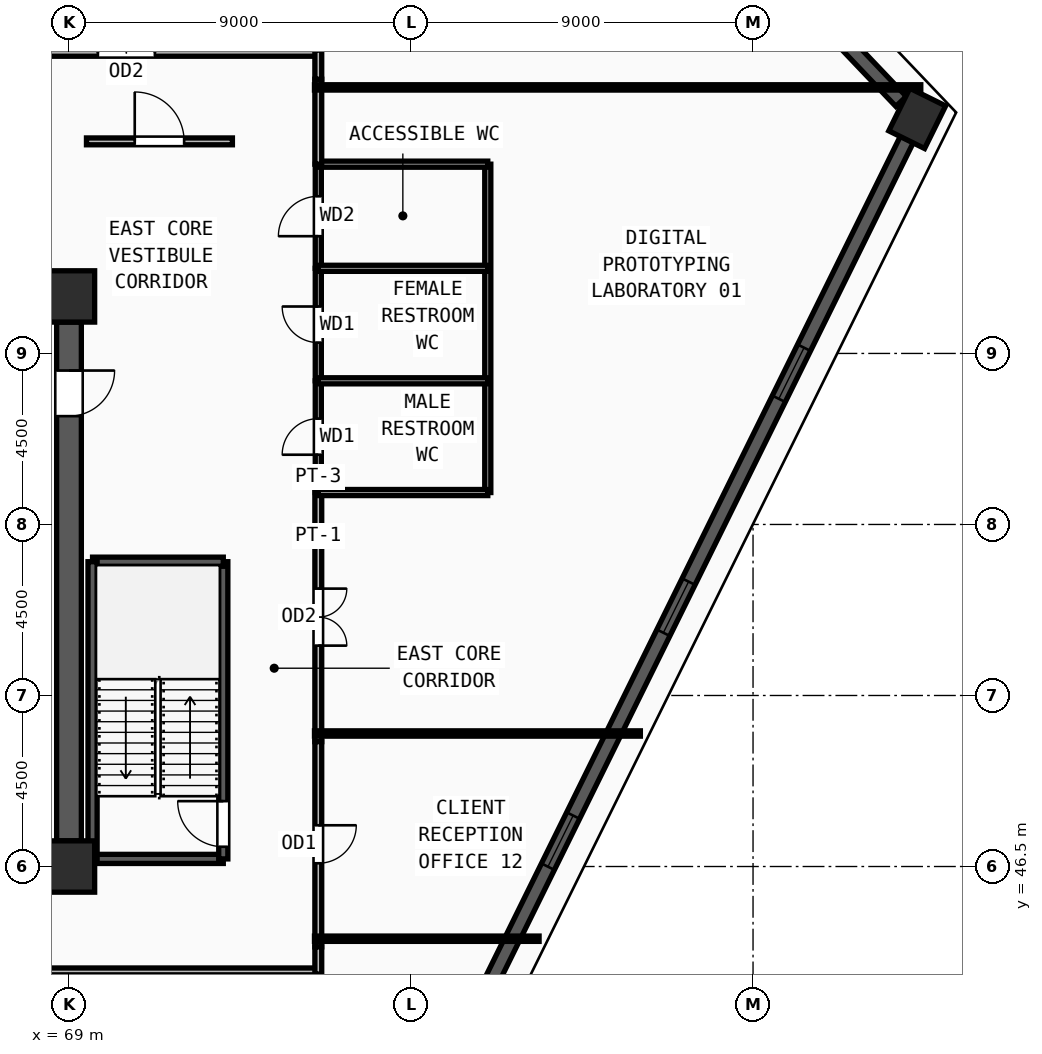
"""IFC4 building model, lengths in metres.
Left out: names, types, materials, properties, quantities, classifications, styles, units other than length and angle.
Written with IfcOpenShell. Run it as: python <this file> out.ifc"""

import sys

from ifc_helpers import new_model, si_unit, direction, frame, frame_2d, origin, origin_2d, place, context, subcontext, project, spatial, rectangle, extrude, source, transform, mapped, element, fill, save


model = new_model("IFC4")
c1 = context("Model", 3, precision=1e-05, world=origin(), true_north=direction((0.0, 1.0)))
c2 = subcontext(c1, "Body", "Model", "MODEL_VIEW")
j1 = project(units=[si_unit("LENGTHUNIT", "METRE"), si_unit("PLANEANGLEUNIT", "RADIAN")], contexts=[c1])
p1 = place(None, origin())
s1 = spatial("IfcSite", under=j1, at=p1, CompositionType="ELEMENT")
p2 = place(p1, origin())
s2 = spatial("IfcBuilding", under=s1, at=p2, CompositionType="ELEMENT")
p3 = place(p2, frame((0.0, 0.0, 270.0)))
s3 = spatial("IfcBuildingStorey", under=s2, at=p3, CompositionType="ELEMENT", Elevation=270.0)
m1 = source(origin(), c2, "Body", "SweptSolid", [
    extrude(rectangle(XDim=1.35, YDim=1.35, at=origin_2d()), origin(), (0.0, 0.0, 1.0), 3.75),
])
for number, where, z_axis, x_axis in (
    (1, (69.0, 46.5, 0.0), (0.0, 0.0, 1.0), (1.0, 0.0, 0.0)),
    (2, (69.0, 61.5, 0.0), (0.0, 0.0, 1.0), (1.0, 0.0, 0.0)),
):
    element("IfcColumn", number, at=place(p3, frame(where, z_axis=z_axis, x_axis=x_axis)), inside=s3, PredefinedType="COLUMN", context=c2, shape_type="MappedRepresentation", body=[
        mapped(m1, transform((0.0, 0.0, 0.0), x_axis=(1.0, 0.0, 0.0), y_axis=(0.0, 1.0, 0.0), z_axis=(0.0, 0.0, 1.0), scale=1.0)),
    ])
m2 = source(origin(), c2, "Body", "SweptSolid", [
    extrude(rectangle(XDim=1.25, YDim=1.05, at=origin_2d()), origin(), (0.0, 0.0, 1.0), 3.75),
])
p4 = place(p3, frame((91.32, 66.185, 0.0), z_axis=(0.0, 0.0, 1.0), x_axis=(0.442601730913, 0.896718299017, 0.0)))
e3 = element("IfcColumn", 3, at=p4, inside=s3, PredefinedType="COLUMN", context=c2, shape_type="MappedRepresentation", body=[
    mapped(m2, transform((0.0, 0.0, 0.0), x_axis=(1.0, 0.0, 0.0), y_axis=(0.0, 1.0, 0.0), z_axis=(0.0, 0.0, 1.0), scale=1.0)),
])
p5 = place(p3, frame((78.897, 41.013, 0.0), z_axis=(0.0, 0.0, 1.0), x_axis=(0.44256239755, 0.896737712084, 0.0)))
e4 = element("IfcWall", 4, at=p5, inside=s3, PredefinedType="SOLIDWALL", context=c2, shape_type="SweptSolid", body=[
    extrude(rectangle(XDim=27.456, YDim=0.38, at=frame_2d((13.728, 0.0))), origin(), (0.0, 0.0, 1.0), 3.57),
])
m3 = source(origin(), c2, "Body", "SweptSolid", [
    extrude(rectangle(XDim=1.5, YDim=1.9, at=frame_2d((0.75, 0.95))), frame((0.0, 0.2, 0.0), z_axis=(0.0, -1.0, 0.0), x_axis=(1.0, 0.0, 0.0)), (0.0, 0.0, 1.0), 0.4),
])
p6 = place(p5, frame((6.114, 0.0, 0.55)))
e5 = element("IfcOpeningElement", 5, at=p6, cuts=e4, PredefinedType="OPENING", context=c2, shape_type="MappedRepresentation", body=[
    mapped(m3, transform((0.0, 0.0, 0.0), x_axis=(1.0, 0.0, 0.0), y_axis=(0.0, 1.0, 0.0), z_axis=(0.0, 0.0, 1.0), scale=1.0)),
])
p7 = place(p5, frame((12.978, 0.0, 0.55)))
e6 = element("IfcOpeningElement", 6, at=p7, cuts=e4, PredefinedType="OPENING", context=c2, shape_type="MappedRepresentation", body=[
    mapped(m3, transform((0.0, 0.0, 0.0), x_axis=(1.0, 0.0, 0.0), y_axis=(0.0, 1.0, 0.0), z_axis=(0.0, 0.0, 1.0), scale=1.0)),
])
p8 = place(p5, frame((19.842, 0.0, 0.55)))
e7 = element("IfcOpeningElement", 7, at=p8, cuts=e4, PredefinedType="OPENING", context=c2, shape_type="MappedRepresentation", body=[
    mapped(m3, transform((0.0, 0.0, 0.0), x_axis=(1.0, 0.0, 0.0), y_axis=(0.0, 1.0, 0.0), z_axis=(0.0, 0.0, 1.0), scale=1.0)),
])
p9 = place(p3, frame((90.896, 66.631, 0.0), z_axis=(0.0, 0.0, 1.0), x_axis=(-0.689385443417, 0.724394720028, 0.0)))
e8 = element("IfcWall", 8, at=p9, inside=s3, PredefinedType="SOLIDWALL", context=c2, shape_type="SweptSolid", body=[
    extrude(rectangle(XDim=4.024, YDim=0.38, at=frame_2d((2.012, 0.0))), origin(), (0.0, 0.0, 1.0), 3.57),
])
p10 = place(p3, frame((69.0, 60.825, 0.0), z_axis=(0.0, 0.0, 1.0), x_axis=(0.0, -1.0, 0.0)))
e9 = element("IfcWall", 9, at=p10, inside=s3, PredefinedType="SHEAR", context=c2, shape_type="SweptSolid", body=[
    extrude(rectangle(XDim=13.65, YDim=0.65, at=frame_2d((6.825, 0.0))), origin(), (0.0, 0.0, 1.0), 3.57),
])
m4 = source(origin(), c2, "Body", "SweptSolid", [
    extrude(rectangle(XDim=1.2, YDim=2.2, at=frame_2d((0.6, 1.1))), frame((0.0, 0.335, 0.0), z_axis=(0.0, -1.0, 0.0), x_axis=(1.0, 0.0, 0.0)), (0.0, 0.0, 1.0), 0.67),
])
p11 = place(p10, frame((1.275, 0.0, 0.0)))
e10 = element("IfcOpeningElement", 10, at=p11, cuts=e9, PredefinedType="OPENING", context=c2, shape_type="MappedRepresentation", body=[
    mapped(m4, transform((0.0, 0.0, 0.0), x_axis=(1.0, 0.0, 0.0), y_axis=(0.0, 1.0, 0.0), z_axis=(0.0, 0.0, 1.0), scale=1.0)),
])
p12 = place(p3, frame((69.62, 46.7, 0.0), z_axis=(0.0, 0.0, 1.0), x_axis=(1.0, 0.0, 0.0)))
e11 = element("IfcWall", 11, at=p12, inside=s3, PredefinedType="SOLIDWALL", context=c2, shape_type="SweptSolid", body=[
    extrude(rectangle(XDim=3.44, YDim=0.24, at=frame_2d((1.72, 0.0))), origin(), (0.0, 0.0, 1.0), 3.57),
])
p13 = place(p3, frame((73.06, 46.7, 0.0), z_axis=(0.0, 0.0, 1.0), x_axis=(0.0, 1.0, 0.0)))
e12 = element("IfcWall", 12, at=p13, inside=s3, PredefinedType="SOLIDWALL", context=c2, shape_type="SweptSolid", body=[
    extrude(rectangle(XDim=7.82, YDim=0.24, at=frame_2d((3.91, 0.0))), origin(), (0.0, 0.0, 1.0), 3.57),
])
m5 = source(origin(), c2, "Body", "SweptSolid", [
    extrude(rectangle(XDim=1.2, YDim=2.2, at=frame_2d((0.6, 1.1))), frame((0.0, 0.13, 0.0), z_axis=(0.0, -1.0, 0.0), x_axis=(1.0, 0.0, 0.0)), (0.0, 0.0, 1.0), 0.26),
])
p14 = place(p13, frame((0.32, 0.0, 0.0)))
e13 = element("IfcOpeningElement", 13, at=p14, cuts=e12, PredefinedType="OPENING", context=c2, shape_type="MappedRepresentation", body=[
    mapped(m5, transform((0.0, 0.0, 0.0), x_axis=(1.0, 0.0, 0.0), y_axis=(0.0, 1.0, 0.0), z_axis=(0.0, 0.0, 1.0), scale=1.0)),
])
p15 = place(p3, frame((73.06, 54.52, 0.0), z_axis=(0.0, 0.0, 1.0), x_axis=(-1.0, 0.0, 0.0)))
e14 = element("IfcWall", 14, at=p15, inside=s3, PredefinedType="SOLIDWALL", context=c2, shape_type="SweptSolid", body=[
    extrude(rectangle(XDim=3.44, YDim=0.24, at=frame_2d((1.72, 0.0))), origin(), (0.0, 0.0, 1.0), 3.57),
])
p16 = place(p3, frame((69.62, 54.52, 0.0), z_axis=(0.0, 0.0, 1.0), x_axis=(0.0, -1.0, 0.0)))
e15 = element("IfcWall", 15, at=p16, inside=s3, PredefinedType="SOLIDWALL", context=c2, shape_type="SweptSolid", body=[
    extrude(rectangle(XDim=7.82, YDim=0.24, at=frame_2d((3.91, 0.0))), origin(), (0.0, 0.0, 1.0), 3.57),
])
p17 = place(p3, frame((75.56, 56.34, 0.0), z_axis=(0.0, 0.0, 1.0), x_axis=(0.0, 1.0, 0.0)))
e16 = element("IfcWall", 16, at=p17, inside=s3, PredefinedType="PARTITIONING", context=c2, shape_type="SweptSolid", body=[
    extrude(rectangle(XDim=2.94, YDim=0.16, at=frame_2d((1.47, 0.0))), origin(), (0.0, 0.0, 1.0), 3.57),
])
m6 = source(origin(), c2, "Body", "SweptSolid", [
    extrude(rectangle(XDim=0.95, YDim=2.15, at=frame_2d((0.475, 1.075))), frame((0.0, 0.09, 0.0), z_axis=(0.0, -1.0, 0.0), x_axis=(1.0, 0.0, 0.0)), (0.0, 0.0, 1.0), 0.18),
])
p18 = place(p17, frame((0.995, 0.0, 0.0)))
e17 = element("IfcOpeningElement", 17, at=p18, cuts=e16, PredefinedType="OPENING", context=c2, shape_type="MappedRepresentation", body=[
    mapped(m6, transform((0.0, 0.0, 0.0), x_axis=(1.0, 0.0, 0.0), y_axis=(0.0, 1.0, 0.0), z_axis=(0.0, 0.0, 1.0), scale=1.0)),
])
p19 = place(p3, frame((75.56, 59.28, 0.0), z_axis=(0.0, 0.0, 1.0), x_axis=(0.0, 1.0, 0.0)))
e18 = element("IfcWall", 18, at=p19, inside=s3, PredefinedType="PARTITIONING", context=c2, shape_type="SweptSolid", body=[
    extrude(rectangle(XDim=2.96, YDim=0.16, at=frame_2d((1.48, 0.0))), origin(), (0.0, 0.0, 1.0), 3.57),
])
p20 = place(p19, frame((1.005, 0.0, 0.0)))
e19 = element("IfcOpeningElement", 19, at=p20, cuts=e18, PredefinedType="OPENING", context=c2, shape_type="MappedRepresentation", body=[
    mapped(m6, transform((0.0, 0.0, 0.0), x_axis=(1.0, 0.0, 0.0), y_axis=(0.0, 1.0, 0.0), z_axis=(0.0, 0.0, 1.0), scale=1.0)),
])
p21 = place(p3, frame((75.56, 62.24, 0.0), z_axis=(0.0, 0.0, 1.0), x_axis=(0.0, 1.0, 0.0)))
e20 = element("IfcWall", 20, at=p21, inside=s3, PredefinedType="PARTITIONING", context=c2, shape_type="SweptSolid", body=[
    extrude(rectangle(XDim=2.74, YDim=0.16, at=frame_2d((1.37, 0.0))), origin(), (0.0, 0.0, 1.0), 3.57),
])
m7 = source(origin(), c2, "Body", "SweptSolid", [
    extrude(rectangle(XDim=1.05, YDim=2.15, at=frame_2d((0.525, 1.075))), frame((0.0, 0.09, 0.0), z_axis=(0.0, -1.0, 0.0), x_axis=(1.0, 0.0, 0.0)), (0.0, 0.0, 1.0), 0.18),
])
p22 = place(p21, frame((0.845, 0.0, 0.0)))
e21 = element("IfcOpeningElement", 21, at=p22, cuts=e20, PredefinedType="OPENING", context=c2, shape_type="MappedRepresentation", body=[
    mapped(m7, transform((0.0, 0.0, 0.0), x_axis=(1.0, 0.0, 0.0), y_axis=(0.0, 1.0, 0.0), z_axis=(0.0, 0.0, 1.0), scale=1.0)),
])
p23 = place(p3, frame((69.46, 65.58, 0.0), z_axis=(0.0, 0.0, 1.0), x_axis=(1.0, 0.0, 0.0)))
e22 = element("IfcWall", 22, at=p23, inside=s3, PredefinedType="PARTITIONING", context=c2, shape_type="SweptSolid", body=[
    extrude(rectangle(XDim=3.84, YDim=0.18, at=frame_2d((1.92, 0.0))), origin(), (0.0, 0.0, 1.0), 3.57),
])
m8 = source(origin(), c2, "Body", "SweptSolid", [
    extrude(rectangle(XDim=1.3, YDim=2.2, at=frame_2d((0.65, 1.1))), frame((0.0, 0.1, 0.0), z_axis=(0.0, -1.0, 0.0), x_axis=(1.0, 0.0, 0.0)), (0.0, 0.0, 1.0), 0.2),
])
p24 = place(p23, frame((1.27, 0.0, 0.0)))
e23 = element("IfcOpeningElement", 23, at=p24, cuts=e22, PredefinedType="OPENING", context=c2, shape_type="MappedRepresentation", body=[
    mapped(m8, transform((0.0, 0.0, 0.0), x_axis=(1.0, 0.0, 0.0), y_axis=(0.0, 1.0, 0.0), z_axis=(0.0, 0.0, 1.0), scale=1.0)),
])
p25 = place(p3, frame((75.56, 56.34, 0.0), z_axis=(0.0, 0.0, 1.0), x_axis=(0.0, -1.0, 0.0)))
e24 = element("IfcWall", 24, at=p25, inside=s3, PredefinedType="PARTITIONING", context=c2, shape_type="SweptSolid", body=[
    extrude(rectangle(XDim=6.555, YDim=0.18, at=frame_2d((3.278, 0.0))), origin(), (0.0, 0.0, 1.0), 3.57),
])
m9 = source(origin(), c2, "Body", "SweptSolid", [
    extrude(rectangle(XDim=1.5, YDim=2.2, at=frame_2d((0.75, 1.1))), frame((0.0, 0.1, 0.0), z_axis=(0.0, -1.0, 0.0), x_axis=(1.0, 0.0, 0.0)), (0.0, 0.0, 1.0), 0.2),
])
p26 = place(p25, frame((2.528, 0.0, 0.0)))
e25 = element("IfcOpeningElement", 25, at=p26, cuts=e24, PredefinedType="OPENING", context=c2, shape_type="MappedRepresentation", body=[
    mapped(m9, transform((0.0, 0.0, 0.0), x_axis=(1.0, 0.0, 0.0), y_axis=(0.0, 1.0, 0.0), z_axis=(0.0, 0.0, 1.0), scale=1.0)),
])
p27 = place(p3, frame((65.39, 67.91, 0.0), z_axis=(0.0, 0.0, 1.0), x_axis=(1.0, 0.0, 0.0)))
e26 = element("IfcWall", 26, at=p27, inside=s3, PredefinedType="PARTITIONING", context=c2, shape_type="SweptSolid", body=[
    extrude(rectangle(XDim=10.24, YDim=0.18, at=frame_2d((5.12, 0.0))), origin(), (0.0, 0.0, 1.0), 3.205),
])
p28 = place(p27, frame((4.37, 0.0, 0.0)))
e27 = element("IfcOpeningElement", 27, at=p28, cuts=e26, PredefinedType="OPENING", context=c2, shape_type="MappedRepresentation", body=[
    mapped(m9, transform((0.0, 0.0, 0.0), x_axis=(1.0, 0.0, 0.0), y_axis=(0.0, 1.0, 0.0), z_axis=(0.0, 0.0, 1.0), scale=1.0)),
])
p29 = place(p3, frame((75.63, 43.74, 0.0), z_axis=(0.0, 0.0, 1.0), x_axis=(-1.0, 0.0, 0.0)))
e28 = element("IfcWall", 28, at=p29, inside=s3, PredefinedType="PARTITIONING", context=c2, shape_type="SweptSolid", body=[
    extrude(rectangle(XDim=20.415, YDim=0.18, at=frame_2d((10.208, 0.0))), origin(), (0.0, 0.0, 1.0), 3.57),
])
p30 = place(p29, frame((9.457, 0.0, 0.0)))
e29 = element("IfcOpeningElement", 29, at=p30, cuts=e28, PredefinedType="OPENING", context=c2, shape_type="MappedRepresentation", body=[
    mapped(m9, transform((0.0, 0.0, 0.0), x_axis=(1.0, 0.0, 0.0), y_axis=(0.0, 1.0, 0.0), z_axis=(0.0, 0.0, 1.0), scale=1.0)),
])
p31 = place(p3, frame((75.56, 49.785, 0.0), z_axis=(0.0, 0.0, 1.0), x_axis=(0.0, -1.0, 0.0)))
e30 = element("IfcWall", 30, at=p31, inside=s3, PredefinedType="PARTITIONING", context=c2, shape_type="SweptSolid", body=[
    extrude(rectangle(XDim=5.4, YDim=0.18, at=frame_2d((2.7, 0.0))), origin(), (0.0, 0.0, 1.0), 3.57),
])
m10 = source(origin(), c2, "Body", "SweptSolid", [
    extrude(rectangle(XDim=1.0, YDim=2.2, at=frame_2d((0.5, 1.1))), frame((0.0, 0.1, 0.0), z_axis=(0.0, -1.0, 0.0), x_axis=(1.0, 0.0, 0.0)), (0.0, 0.0, 1.0), 0.2),
])
p32 = place(p31, frame((2.2, 0.0, 0.0)))
e31 = element("IfcOpeningElement", 31, at=p32, cuts=e30, PredefinedType="OPENING", context=c2, shape_type="MappedRepresentation", body=[
    mapped(m10, transform((0.0, 0.0, 0.0), x_axis=(1.0, 0.0, 0.0), y_axis=(0.0, 1.0, 0.0), z_axis=(0.0, 0.0, 1.0), scale=1.0)),
])
p33 = place(p3, frame((80.02, 56.34, 0.0), z_axis=(0.0, 0.0, 1.0), x_axis=(0.0, 1.0, 0.0)))
e32 = element("IfcWall", 32, at=p33, inside=s3, PredefinedType="PARTITIONING", context=c2, shape_type="SweptSolid", body=[
    extrude(rectangle(XDim=8.64, YDim=0.16, at=frame_2d((4.32, 0.0))), origin(), (0.0, 0.0, 1.0), 3.57),
])
for number, where, z_axis, x_axis in (
    (33, (75.56, 56.34, 0.0), (0.0, 0.0, 1.0), (1.0, 0.0, 0.0)),
    (34, (75.56, 59.28, 0.0), (0.0, 0.0, 1.0), (1.0, 0.0, 0.0)),
    (35, (75.56, 62.24, 0.0), (0.0, 0.0, 1.0), (1.0, 0.0, 0.0)),
    (36, (75.56, 64.98, 0.0), (0.0, 0.0, 1.0), (1.0, 0.0, 0.0)),
):
    element("IfcWall", number, at=place(p3, frame(where, z_axis=z_axis, x_axis=x_axis)), inside=s3, PredefinedType="PARTITIONING", context=c2, shape_type="SweptSolid", body=[
        extrude(rectangle(XDim=4.46, YDim=0.16, at=frame_2d((2.23, 0.0))), origin(), (0.0, 0.0, 1.0), 3.57),
    ])
p34 = place(p3, frame((75.56, 67.215, 0.0), z_axis=(0.0, 0.0, 1.0), x_axis=(0.0, -1.0, 0.0)))
e37 = element("IfcWall", 37, at=p34, inside=s3, PredefinedType="PARTITIONING", context=c2, shape_type="SweptSolid", body=[
    extrude(rectangle(XDim=2.235, YDim=0.18, at=frame_2d((1.118, 0.0))), origin(), (0.0, 0.0, 1.0), 3.57),
])
p35 = place(p3, frame((75.56, 67.98, 0.0), z_axis=(0.0, 0.0, 1.0), x_axis=(0.0, -1.0, 0.0)))
e38 = element("IfcWall", 38, at=p35, inside=s3, PredefinedType="PARTITIONING", context=c2, shape_type="SweptSolid", body=[
    extrude(rectangle(XDim=0.765, YDim=0.18, at=frame_2d((0.382, 0.0))), origin(), (0.0, 0.0, 1.0), 3.57),
])
p36 = place(p3, frame((75.56, 44.385, 0.0), z_axis=(0.0, 0.0, 1.0), x_axis=(0.0, -1.0, 0.0)))
e39 = element("IfcWall", 39, at=p36, inside=s3, PredefinedType="PARTITIONING", context=c2, shape_type="SweptSolid", body=[
    extrude(rectangle(XDim=0.715, YDim=0.18, at=frame_2d((0.357, 0.0))), origin(), (0.0, 0.0, 1.0), 3.57),
])
p37 = place(p3, frame((75.46, 44.6, 0.0), z_axis=(0.0, 0.0, 1.0), x_axis=(1.0, 0.0, 0.0)))
e40 = element("IfcWall", 40, at=p37, inside=s3, PredefinedType="PARTITIONING", context=c2, shape_type="SweptSolid", body=[
    extrude(rectangle(XDim=5.91, YDim=0.14, at=frame_2d((2.955, 0.0))), origin(), (0.0, 0.0, 1.0), 3.57),
])
p38 = place(p3, frame((75.46, 50.0, 0.0), z_axis=(0.0, 0.0, 1.0), x_axis=(1.0, 0.0, 0.0)))
e41 = element("IfcWall", 41, at=p38, inside=s3, PredefinedType="PARTITIONING", context=c2, shape_type="SweptSolid", body=[
    extrude(rectangle(XDim=8.575, YDim=0.14, at=frame_2d((4.288, 0.0))), origin(), (0.0, 0.0, 1.0), 3.57),
])
p39 = place(p3, frame((75.46, 67.0, 0.0), z_axis=(0.0, 0.0, 1.0), x_axis=(1.0, 0.0, 0.0)))
e42 = element("IfcWall", 42, at=p39, inside=s3, PredefinedType="PARTITIONING", context=c2, shape_type="SweptSolid", body=[
    extrude(rectangle(XDim=15.954, YDim=0.14, at=frame_2d((7.977, 0.0))), origin(), (0.0, 0.0, 1.0), 3.57),
])
m11 = source(origin(), c2, "Body", "SweptSolid", [
    extrude(rectangle(XDim=1.5, YDim=1.9, at=frame_2d((0.75, 0.95))), frame((0.0, 0.03, 0.0), z_axis=(0.0, -1.0, 0.0), x_axis=(1.0, 0.0, 0.0)), (0.0, 0.0, 1.0), 0.06),
])
p40 = place(p6, origin())
e43 = element("IfcWindow", 43, at=p40, inside=s3, PartitioningType="DOUBLE_PANEL_VERTICAL", PredefinedType="WINDOW", context=c2, shape_type="MappedRepresentation", body=[
    mapped(m11, transform((0.0, 0.0, 0.0), x_axis=(1.0, 0.0, 0.0), y_axis=(0.0, 1.0, 0.0), z_axis=(0.0, 0.0, 1.0), scale=1.0)),
])
fill(e5, e43)
p41 = place(p7, origin())
e44 = element("IfcWindow", 44, at=p41, inside=s3, PartitioningType="DOUBLE_PANEL_VERTICAL", PredefinedType="WINDOW", context=c2, shape_type="MappedRepresentation", body=[
    mapped(m11, transform((0.0, 0.0, 0.0), x_axis=(1.0, 0.0, 0.0), y_axis=(0.0, 1.0, 0.0), z_axis=(0.0, 0.0, 1.0), scale=1.0)),
])
fill(e6, e44)
p42 = place(p8, origin())
e45 = element("IfcWindow", 45, at=p42, inside=s3, PartitioningType="DOUBLE_PANEL_VERTICAL", PredefinedType="WINDOW", context=c2, shape_type="MappedRepresentation", body=[
    mapped(m11, transform((0.0, 0.0, 0.0), x_axis=(1.0, 0.0, 0.0), y_axis=(0.0, 1.0, 0.0), z_axis=(0.0, 0.0, 1.0), scale=1.0)),
])
fill(e7, e45)
m12 = source(origin(), c2, "Body", "SweptSolid", [
    extrude(rectangle(XDim=1.2, YDim=2.2, at=frame_2d((0.6, 1.1))), frame((0.0, 0.025, 0.0), z_axis=(0.0, -1.0, 0.0), x_axis=(1.0, 0.0, 0.0)), (0.0, 0.0, 1.0), 0.05),
])
p43 = place(p11, origin())
e46 = element("IfcDoor", 46, at=p43, inside=s3, OperationType="SINGLE_SWING_LEFT", PredefinedType="DOOR", context=c2, shape_type="MappedRepresentation", body=[
    mapped(m12, transform((0.0, 0.0, 0.0), x_axis=(1.0, 0.0, 0.0), y_axis=(0.0, 1.0, 0.0), z_axis=(0.0, 0.0, 1.0), scale=1.0)),
])
fill(e10, e46)
p44 = place(p14, origin())
e47 = element("IfcDoor", 47, at=p44, inside=s3, OperationType="SINGLE_SWING_RIGHT", PredefinedType="DOOR", context=c2, shape_type="MappedRepresentation", body=[
    mapped(m12, transform((0.0, 0.0, 0.0), x_axis=(1.0, 0.0, 0.0), y_axis=(0.0, 1.0, 0.0), z_axis=(0.0, 0.0, 1.0), scale=1.0)),
])
fill(e13, e47)
m13 = source(origin(), c2, "Body", "SweptSolid", [
    extrude(rectangle(XDim=0.95, YDim=2.15, at=frame_2d((0.475, 1.075))), frame((0.0, 0.025, 0.0), z_axis=(0.0, -1.0, 0.0), x_axis=(1.0, 0.0, 0.0)), (0.0, 0.0, 1.0), 0.05),
])
p45 = place(p18, origin())
e48 = element("IfcDoor", 48, at=p45, inside=s3, OperationType="SINGLE_SWING_LEFT", PredefinedType="DOOR", context=c2, shape_type="MappedRepresentation", body=[
    mapped(m13, transform((0.0, 0.0, 0.0), x_axis=(1.0, 0.0, 0.0), y_axis=(0.0, 1.0, 0.0), z_axis=(0.0, 0.0, 1.0), scale=1.0)),
])
fill(e17, e48)
p46 = place(p20, origin())
e49 = element("IfcDoor", 49, at=p46, inside=s3, OperationType="SINGLE_SWING_RIGHT", PredefinedType="DOOR", context=c2, shape_type="MappedRepresentation", body=[
    mapped(m13, transform((0.0, 0.0, 0.0), x_axis=(1.0, 0.0, 0.0), y_axis=(0.0, 1.0, 0.0), z_axis=(0.0, 0.0, 1.0), scale=1.0)),
])
fill(e19, e49)
m14 = source(origin(), c2, "Body", "SweptSolid", [
    extrude(rectangle(XDim=1.05, YDim=2.15, at=frame_2d((0.525, 1.075))), frame((0.0, 0.025, 0.0), z_axis=(0.0, -1.0, 0.0), x_axis=(1.0, 0.0, 0.0)), (0.0, 0.0, 1.0), 0.05),
])
p47 = place(p22, origin())
e50 = element("IfcDoor", 50, at=p47, inside=s3, OperationType="SINGLE_SWING_LEFT", PredefinedType="DOOR", context=c2, shape_type="MappedRepresentation", body=[
    mapped(m14, transform((0.0, 0.0, 0.0), x_axis=(1.0, 0.0, 0.0), y_axis=(0.0, 1.0, 0.0), z_axis=(0.0, 0.0, 1.0), scale=1.0)),
])
fill(e21, e50)
m15 = source(origin(), c2, "Body", "SweptSolid", [
    extrude(rectangle(XDim=1.3, YDim=2.2, at=frame_2d((0.65, 1.1))), frame((0.0, 0.025, 0.0), z_axis=(0.0, -1.0, 0.0), x_axis=(1.0, 0.0, 0.0)), (0.0, 0.0, 1.0), 0.05),
])
p48 = place(p24, origin())
e51 = element("IfcDoor", 51, at=p48, inside=s3, OperationType="SINGLE_SWING_LEFT", PredefinedType="DOOR", context=c2, shape_type="MappedRepresentation", body=[
    mapped(m15, transform((0.0, 0.0, 0.0), x_axis=(1.0, 0.0, 0.0), y_axis=(0.0, 1.0, 0.0), z_axis=(0.0, 0.0, 1.0), scale=1.0)),
])
fill(e23, e51)
m16 = source(origin(), c2, "Body", "SweptSolid", [
    extrude(rectangle(XDim=1.5, YDim=2.2, at=frame_2d((0.75, 1.1))), frame((0.0, 0.025, 0.0), z_axis=(0.0, -1.0, 0.0), x_axis=(1.0, 0.0, 0.0)), (0.0, 0.0, 1.0), 0.05),
])
p49 = place(p26, origin())
e52 = element("IfcDoor", 52, at=p49, inside=s3, OperationType="DOUBLE_DOOR_SINGLE_SWING", PredefinedType="DOOR", context=c2, shape_type="MappedRepresentation", body=[
    mapped(m16, transform((0.0, 0.0, 0.0), x_axis=(1.0, 0.0, 0.0), y_axis=(0.0, 1.0, 0.0), z_axis=(0.0, 0.0, 1.0), scale=1.0)),
])
fill(e25, e52)
p50 = place(p28, origin())
e53 = element("IfcDoor", 53, at=p50, inside=s3, OperationType="DOUBLE_DOOR_SINGLE_SWING", PredefinedType="DOOR", context=c2, shape_type="MappedRepresentation", body=[
    mapped(m16, transform((0.0, 0.0, 0.0), x_axis=(1.0, 0.0, 0.0), y_axis=(0.0, 1.0, 0.0), z_axis=(0.0, 0.0, 1.0), scale=1.0)),
])
fill(e27, e53)
m17 = source(origin(), c2, "Body", "SweptSolid", [
    extrude(rectangle(XDim=1.0, YDim=2.2, at=frame_2d((0.5, 1.1))), frame((0.0, 0.025, 0.0), z_axis=(0.0, -1.0, 0.0), x_axis=(1.0, 0.0, 0.0)), (0.0, 0.0, 1.0), 0.05),
])
p51 = place(p32, origin())
e54 = element("IfcDoor", 54, at=p51, inside=s3, OperationType="SINGLE_SWING_LEFT", PredefinedType="DOOR", context=c2, shape_type="MappedRepresentation", body=[
    mapped(m17, transform((0.0, 0.0, 0.0), x_axis=(1.0, 0.0, 0.0), y_axis=(0.0, 1.0, 0.0), z_axis=(0.0, 0.0, 1.0), scale=1.0)),
])
fill(e31, e54)
save(model, sys.argv[1])
